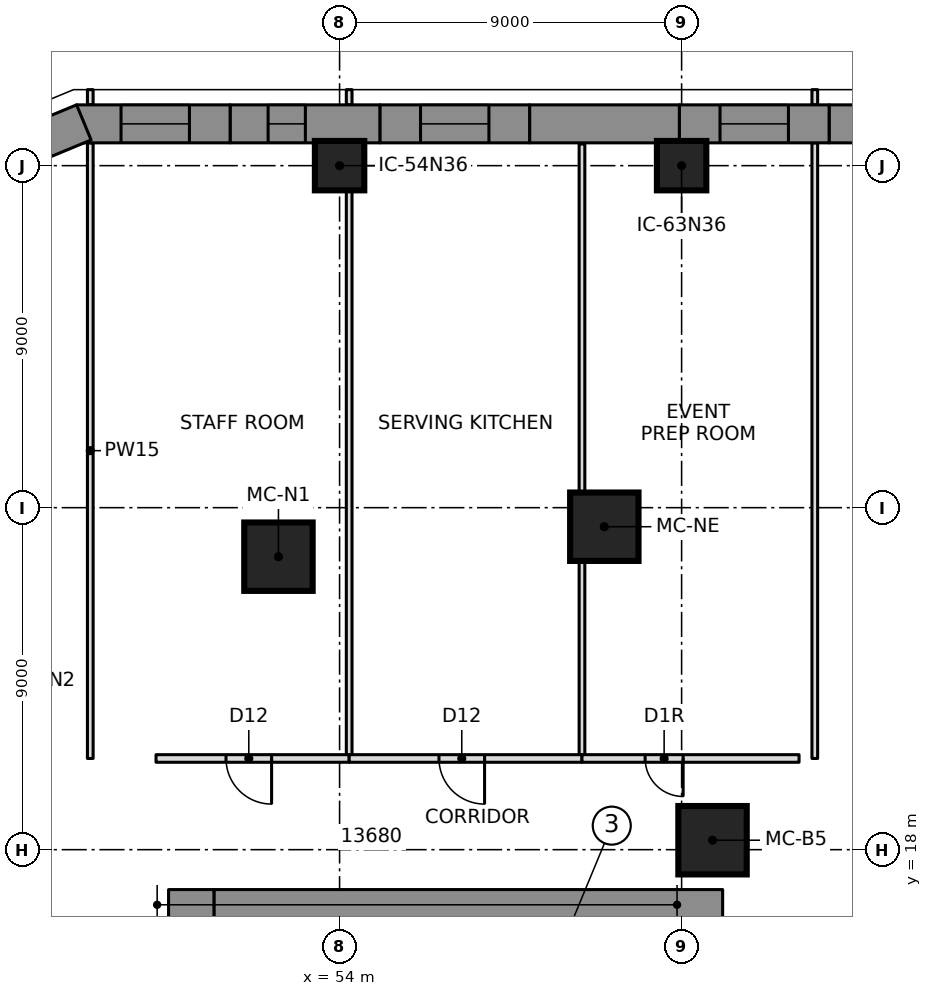
"""IFC4 building model, lengths in metres.
Left out: names, types, materials, properties, quantities, classifications, styles, units other than length and angle.
Written with IfcOpenShell. Run it as: python <this file> out.ifc"""

import sys

from ifc_helpers import new_model, si_unit, direction, frame, frame_2d, origin, origin_2d, place, context, subcontext, project, spatial, polyline, rectangle, outline, extrude, element, fill, save


model = new_model("IFC4")
c1 = context("Model", 3, precision=1e-05, world=origin(), true_north=direction((0.0, 1.0)))
c2 = subcontext(c1, "Body", "Model", "MODEL_VIEW")
j1 = project(units=[si_unit("LENGTHUNIT", "METRE"), si_unit("PLANEANGLEUNIT", "RADIAN")], contexts=[c1])
p1 = place(None, origin())
s1 = spatial("IfcSite", under=j1, at=p1, CompositionType="ELEMENT")
p2 = place(p1, origin())
s2 = spatial("IfcBuilding", under=s1, at=p2, CompositionType="ELEMENT")
p3 = place(p2, frame((0.0, 0.0, 24.0)))
s3 = spatial("IfcBuildingStorey", under=s2, at=p3, CompositionType="ELEMENT", Elevation=24.0)
p4 = place(p3, frame((50.1, 6.65, 0.0), z_axis=(0.0, 0.0, 1.0), x_axis=(0.0, 1.0, 0.0)))
e1 = element("IfcWall", 1, at=p4, inside=s3, PredefinedType="SHEAR", context=c2, shape_type="SweptSolid", body=[
    extrude(rectangle(XDim=10.3, YDim=1.2, at=frame_2d((5.15, 0.0))), origin(), (0.0, 0.0, 1.0), 5.0),
])
p5 = place(p4, frame((6.5, 0.0, 0.0)))
e2 = element("IfcOpeningElement", 2, at=p5, cuts=e1, PredefinedType="OPENING", context=c2, shape_type="SweptSolid", body=[
    extrude(rectangle(XDim=1.1, YDim=2.1, at=frame_2d((0.55, 1.05))), frame((0.0, 0.61, 0.0), z_axis=(0.0, -1.0, 0.0), x_axis=(1.0, 0.0, 0.0)), (0.0, 0.0, 1.0), 1.22),
])
p6 = place(p3, frame((50.7, 16.35, 0.0), z_axis=(0.0, 0.0, 1.0), x_axis=(1.0, 0.0, 0.0)))
e3 = element("IfcWall", 3, at=p6, inside=s3, PredefinedType="SHEAR", context=c2, shape_type="SweptSolid", body=[
    extrude(rectangle(XDim=13.38, YDim=1.2, at=frame_2d((6.69, 0.0))), origin(), (0.0, 0.0, 1.0), 5.0),
])
for number, where, z_axis, x_axis in (
    (4, (63.813, 18.249, 0.0), (0.0, 0.0, 1.0), (1.0, 0.0, 0.0)),
    (5, (60.966, 26.499, 0.0), (0.0, 0.0, 1.0), (1.0, 0.0, 0.0)),
    (6, (52.392, 25.71, 0.0), (0.0, 0.0, 1.0), (1.0, 0.0, 0.0)),
):
    element("IfcColumn", number, at=place(p3, frame(where, z_axis=z_axis, x_axis=x_axis)), inside=s3, PredefinedType="COLUMN", context=c2, shape_type="SweptSolid", body=[
        extrude(rectangle(XDim=1.8, YDim=1.8, at=origin_2d()), origin(), (0.0, 0.0, 1.0), 5.0),
    ])
for number, where, z_axis, x_axis in (
    (7, (54.0, 36.0, 0.0), (0.0, 0.0, 1.0), (1.0, 0.0, 0.0)),
    (8, (63.0, 36.0, 0.0), (0.0, 0.0, 1.0), (1.0, 0.0, 0.0)),
):
    element("IfcColumn", number, at=place(p3, frame(where, z_axis=z_axis, x_axis=x_axis)), inside=s3, PredefinedType="COLUMN", context=c2, shape_type="SweptSolid", body=[
        extrude(rectangle(XDim=1.3, YDim=1.3, at=origin_2d()), origin(), (0.0, 0.0, 1.0), 4.65),
    ])
p7 = place(p3, frame((70.821, 37.1, 0.0), z_axis=(0.0, 0.0, 1.0), x_axis=(-1.0, 0.0, 0.0)))
e9 = element("IfcWall", 9, at=p7, inside=s3, PredefinedType="NOTDEFINED", context=c2, shape_type="SweptSolid", body=[
    extrude(outline(polyline([(-0.1, -0.5), (3.94, -0.5), (3.94, 0.5), (0.1, 0.5), (-0.1, -0.5)])), origin(), (0.0, 0.0, 1.0), 4.7),
])
p8 = place(p7, frame((1.07, 0.0, 0.9)))
e10 = element("IfcOpeningElement", 10, at=p8, cuts=e9, PredefinedType="OPENING", context=c2, shape_type="SweptSolid", body=[
    extrude(rectangle(XDim=1.8, YDim=2.4, at=frame_2d((0.9, 1.2))), frame((0.0, 0.51, 0.0), z_axis=(0.0, -1.0, 0.0), x_axis=(1.0, 0.0, 0.0)), (0.0, 0.0, 1.0), 1.02),
])
p9 = place(p3, frame((66.881, 37.1, 0.0), z_axis=(0.0, 0.0, 1.0), x_axis=(-1.0, 0.0, 0.0)))
e11 = element("IfcWall", 11, at=p9, inside=s3, PredefinedType="NOTDEFINED", context=c2, shape_type="SweptSolid", body=[
    extrude(outline(polyline([(0.0, -0.5), (3.94, -0.5), (3.94, 0.5), (0.0, 0.5), (0.0, -0.5)])), origin(), (0.0, 0.0, 1.0), 4.7),
])
p10 = place(p9, frame((1.07, 0.0, 0.9)))
e12 = element("IfcOpeningElement", 12, at=p10, cuts=e11, PredefinedType="OPENING", context=c2, shape_type="SweptSolid", body=[
    extrude(rectangle(XDim=1.8, YDim=2.4, at=frame_2d((0.9, 1.2))), frame((0.0, 0.51, 0.0), z_axis=(0.0, -1.0, 0.0), x_axis=(1.0, 0.0, 0.0)), (0.0, 0.0, 1.0), 1.02),
])
p11 = place(p3, frame((62.94, 37.1, 0.0), z_axis=(0.0, 0.0, 1.0), x_axis=(-1.0, 0.0, 0.0)))
e13 = element("IfcWall", 13, at=p11, inside=s3, PredefinedType="NOTDEFINED", context=c2, shape_type="SweptSolid", body=[
    extrude(outline(polyline([(0.0, -0.5), (3.94, -0.5), (3.94, 0.5), (0.0, 0.5), (0.0, -0.5)])), origin(), (0.0, 0.0, 1.0), 4.7),
])
p12 = place(p3, frame((59.0, 37.1, 0.0), z_axis=(0.0, 0.0, 1.0), x_axis=(-1.0, 0.0, 0.0)))
e14 = element("IfcWall", 14, at=p12, inside=s3, PredefinedType="NOTDEFINED", context=c2, shape_type="SweptSolid", body=[
    extrude(outline(polyline([(0.0, -0.5), (3.94, -0.5), (3.94, 0.5), (0.0, 0.5), (0.0, -0.5)])), origin(), (0.0, 0.0, 1.0), 4.7),
])
p13 = place(p12, frame((1.07, 0.0, 0.9)))
e15 = element("IfcOpeningElement", 15, at=p13, cuts=e14, PredefinedType="OPENING", context=c2, shape_type="SweptSolid", body=[
    extrude(rectangle(XDim=1.8, YDim=2.4, at=frame_2d((0.9, 1.2))), frame((0.0, 0.51, 0.0), z_axis=(0.0, -1.0, 0.0), x_axis=(1.0, 0.0, 0.0)), (0.0, 0.0, 1.0), 1.02),
])
p14 = place(p3, frame((55.06, 37.1, 0.0), z_axis=(0.0, 0.0, 1.0), x_axis=(-1.0, 0.0, 0.0)))
e16 = element("IfcWall", 16, at=p14, inside=s3, PredefinedType="NOTDEFINED", context=c2, shape_type="SweptSolid", body=[
    extrude(outline(polyline([(0.0, -0.5), (3.94, -0.5), (3.94, 0.5), (0.0, 0.5), (0.0, -0.5)])), origin(), (0.0, 0.0, 1.0), 4.7),
])
p15 = place(p14, frame((1.96, 0.0, 0.9)))
e17 = element("IfcOpeningElement", 17, at=p15, cuts=e16, PredefinedType="OPENING", context=c2, shape_type="SweptSolid", body=[
    extrude(rectangle(XDim=0.981, YDim=2.4, at=frame_2d((0.49, 1.2))), frame((0.0, 0.51, 0.0), z_axis=(0.0, -1.0, 0.0), x_axis=(1.0, 0.0, 0.0)), (0.0, 0.0, 1.0), 1.02),
])
p16 = place(p3, frame((51.119, 37.1, 0.0), z_axis=(0.0, 0.0, 1.0), x_axis=(-1.0, 0.0, 0.0)))
e18 = element("IfcWall", 18, at=p16, inside=s3, PredefinedType="NOTDEFINED", context=c2, shape_type="SweptSolid", body=[
    extrude(outline(polyline([(0.0, -0.5), (4.04, -0.5), (3.841, 0.5), (0.0, 0.5), (0.0, -0.5)])), origin(), (0.0, 0.0, 1.0), 4.7),
])
p17 = place(p16, frame((1.07, 0.0, 0.9)))
e19 = element("IfcOpeningElement", 19, at=p17, cuts=e18, PredefinedType="OPENING", context=c2, shape_type="SweptSolid", body=[
    extrude(rectangle(XDim=1.8, YDim=2.4, at=frame_2d((0.9, 1.2))), frame((0.0, 0.51, 0.0), z_axis=(0.0, -1.0, 0.0), x_axis=(1.0, 0.0, 0.0)), (0.0, 0.0, 1.0), 1.02),
])
p18 = place(p3, frame((47.179, 37.1, 0.0), z_axis=(0.0, 0.0, 1.0), x_axis=(-0.923862365102, -0.382724875529, 0.0)))
e20 = element("IfcWall", 20, at=p18, inside=s3, PredefinedType="NOTDEFINED", context=c2, shape_type="SweptSolid", body=[
    extrude(outline(polyline([(-0.1, -0.5), (3.482, -0.5), (3.068, 0.5), (0.1, 0.5), (-0.1, -0.5)])), origin(), (0.0, 0.0, 1.0), 4.7),
])
p19 = place(p3, frame((47.44, 20.4, 0.0), z_axis=(0.0, 0.0, 1.0), x_axis=(0.0, 1.0, 0.0)))
e21 = element("IfcWall", 21, at=p19, inside=s3, PredefinedType="PARTITIONING", context=c2, shape_type="SweptSolid", body=[
    extrude(rectangle(XDim=16.2, YDim=0.15, at=frame_2d((8.1, 0.0))), origin(), (0.0, 0.0, 1.0), 4.55),
])
p20 = place(p3, frame((47.44, 37.6, 0.0), z_axis=(0.0, 0.0, 1.0), x_axis=(0.0, 1.0, 0.0)))
e22 = element("IfcWall", 22, at=p20, inside=s3, PredefinedType="PARTITIONING", context=c2, shape_type="SweptSolid", body=[
    extrude(rectangle(XDim=0.4, YDim=0.15, at=frame_2d((0.2, 0.0))), origin(), (0.0, 0.0, 1.0), 4.55),
])
p21 = place(p3, frame((54.252, 20.4, 0.0), z_axis=(0.0, 0.0, 1.0), x_axis=(0.0, 1.0, 0.0)))
e23 = element("IfcWall", 23, at=p21, inside=s3, PredefinedType="PARTITIONING", context=c2, shape_type="SweptSolid", body=[
    extrude(rectangle(XDim=16.2, YDim=0.15, at=frame_2d((8.1, 0.0))), origin(), (0.0, 0.0, 1.0), 4.55),
])
p22 = place(p3, frame((54.252, 37.6, 0.0), z_axis=(0.0, 0.0, 1.0), x_axis=(0.0, 1.0, 0.0)))
e24 = element("IfcWall", 24, at=p22, inside=s3, PredefinedType="PARTITIONING", context=c2, shape_type="SweptSolid", body=[
    extrude(rectangle(XDim=0.4, YDim=0.15, at=frame_2d((0.2, 0.0))), origin(), (0.0, 0.0, 1.0), 4.55),
])
p23 = place(p3, frame((60.378, 20.4, 0.0), z_axis=(0.0, 0.0, 1.0), x_axis=(0.0, 1.0, 0.0)))
e25 = element("IfcWall", 25, at=p23, inside=s3, PredefinedType="PARTITIONING", context=c2, shape_type="SweptSolid", body=[
    extrude(rectangle(XDim=16.17, YDim=0.15, at=frame_2d((8.085, 0.0))), origin(), (0.0, 0.0, 1.0), 4.55),
])
p24 = place(p3, frame((66.504, 20.4, 0.0), z_axis=(0.0, 0.0, 1.0), x_axis=(0.0, 1.0, 0.0)))
e26 = element("IfcWall", 26, at=p24, inside=s3, PredefinedType="PARTITIONING", context=c2, shape_type="SweptSolid", body=[
    extrude(rectangle(XDim=16.2, YDim=0.15, at=frame_2d((8.1, 0.0))), origin(), (0.0, 0.0, 1.0), 4.55),
])
p25 = place(p3, frame((66.504, 37.6, 0.0), z_axis=(0.0, 0.0, 1.0), x_axis=(0.0, 1.0, 0.0)))
e27 = element("IfcWall", 27, at=p25, inside=s3, PredefinedType="PARTITIONING", context=c2, shape_type="SweptSolid", body=[
    extrude(rectangle(XDim=0.4, YDim=0.15, at=frame_2d((0.2, 0.0))), origin(), (0.0, 0.0, 1.0), 4.55),
])
p26 = place(p3, frame((54.252, 20.4, 0.0), z_axis=(0.0, 0.0, 1.0), x_axis=(-1.0, 0.0, 0.0)))
e28 = element("IfcWall", 28, at=p26, inside=s3, PredefinedType="PARTITIONING", context=c2, shape_type="SweptSolid", body=[
    extrude(rectangle(XDim=5.082, YDim=0.2, at=frame_2d((2.541, 0.0))), origin(), (0.0, 0.0, 1.0), 4.55),
])
p27 = place(p26, frame((2.041, 0.0, 0.0)))
e29 = element("IfcOpeningElement", 29, at=p27, cuts=e28, PredefinedType="OPENING", context=c2, shape_type="SweptSolid", body=[
    extrude(rectangle(XDim=1.2, YDim=2.1, at=frame_2d((0.6, 1.05))), frame((0.0, 0.11, 0.0), z_axis=(0.0, -1.0, 0.0), x_axis=(1.0, 0.0, 0.0)), (0.0, 0.0, 1.0), 0.22),
])
p28 = place(p3, frame((60.378, 20.4, 0.0), z_axis=(0.0, 0.0, 1.0), x_axis=(-1.0, 0.0, 0.0)))
e30 = element("IfcWall", 30, at=p28, inside=s3, PredefinedType="PARTITIONING", context=c2, shape_type="SweptSolid", body=[
    extrude(rectangle(XDim=6.126, YDim=0.2, at=frame_2d((3.063, 0.0))), origin(), (0.0, 0.0, 1.0), 4.55),
])
p29 = place(p28, frame((2.563, 0.0, 0.0)))
e31 = element("IfcOpeningElement", 31, at=p29, cuts=e30, PredefinedType="OPENING", context=c2, shape_type="SweptSolid", body=[
    extrude(rectangle(XDim=1.2, YDim=2.1, at=frame_2d((0.6, 1.05))), frame((0.0, 0.11, 0.0), z_axis=(0.0, -1.0, 0.0), x_axis=(1.0, 0.0, 0.0)), (0.0, 0.0, 1.0), 0.22),
])
p30 = place(p3, frame((66.09, 20.4, 0.0), z_axis=(0.0, 0.0, 1.0), x_axis=(-1.0, 0.0, 0.0)))
e32 = element("IfcWall", 32, at=p30, inside=s3, PredefinedType="PARTITIONING", context=c2, shape_type="SweptSolid", body=[
    extrude(rectangle(XDim=5.712, YDim=0.2, at=frame_2d((2.856, 0.0))), origin(), (0.0, 0.0, 1.0), 4.55),
])
p31 = place(p30, frame((3.05, 0.0, 0.0)))
e33 = element("IfcOpeningElement", 33, at=p31, cuts=e32, PredefinedType="OPENING", context=c2, shape_type="SweptSolid", body=[
    extrude(rectangle(XDim=1.0, YDim=2.1, at=frame_2d((0.5, 1.05))), frame((0.0, 0.11, 0.0), z_axis=(0.0, -1.0, 0.0), x_axis=(1.0, 0.0, 0.0)), (0.0, 0.0, 1.0), 0.22),
])
p32 = place(p10, origin())
e34 = element("IfcWindow", 34, at=p32, inside=s3, PartitioningType="SINGLE_PANEL", PredefinedType="WINDOW", context=c2, shape_type="SweptSolid", body=[
    extrude(rectangle(XDim=1.8, YDim=2.4, at=frame_2d((0.9, 1.2))), frame((0.0, 0.5, 0.0), z_axis=(0.0, -1.0, 0.0), x_axis=(1.0, 0.0, 0.0)), (0.0, 0.0, 1.0), 0.06),
])
fill(e12, e34)
p33 = place(p13, origin())
e35 = element("IfcWindow", 35, at=p33, inside=s3, PartitioningType="SINGLE_PANEL", PredefinedType="WINDOW", context=c2, shape_type="SweptSolid", body=[
    extrude(rectangle(XDim=1.8, YDim=2.4, at=frame_2d((0.9, 1.2))), frame((0.0, 0.5, 0.0), z_axis=(0.0, -1.0, 0.0), x_axis=(1.0, 0.0, 0.0)), (0.0, 0.0, 1.0), 0.06),
])
fill(e15, e35)
p34 = place(p15, origin())
e36 = element("IfcWindow", 36, at=p34, inside=s3, PartitioningType="SINGLE_PANEL", PredefinedType="WINDOW", context=c2, shape_type="SweptSolid", body=[
    extrude(rectangle(XDim=0.981, YDim=2.4, at=frame_2d((0.49, 1.2))), frame((0.0, 0.5, 0.0), z_axis=(0.0, -1.0, 0.0), x_axis=(1.0, 0.0, 0.0)), (0.0, 0.0, 1.0), 0.06),
])
fill(e17, e36)
p35 = place(p17, origin())
e37 = element("IfcWindow", 37, at=p35, inside=s3, PartitioningType="SINGLE_PANEL", PredefinedType="WINDOW", context=c2, shape_type="SweptSolid", body=[
    extrude(rectangle(XDim=1.8, YDim=2.4, at=frame_2d((0.9, 1.2))), frame((0.0, 0.5, 0.0), z_axis=(0.0, -1.0, 0.0), x_axis=(1.0, 0.0, 0.0)), (0.0, 0.0, 1.0), 0.06),
])
fill(e19, e37)
p36 = place(p27, origin())
e38 = element("IfcDoor", 38, at=p36, inside=s3, OperationType="SINGLE_SWING_RIGHT", PredefinedType="DOOR", context=c2, shape_type="SweptSolid", body=[
    extrude(rectangle(XDim=1.2, YDim=2.1, at=frame_2d((0.6, 1.05))), frame((0.0, 0.025, 0.0), z_axis=(0.0, -1.0, 0.0), x_axis=(1.0, 0.0, 0.0)), (0.0, 0.0, 1.0), 0.05),
])
fill(e29, e38)
p37 = place(p29, origin())
e39 = element("IfcDoor", 39, at=p37, inside=s3, OperationType="SINGLE_SWING_RIGHT", PredefinedType="DOOR", context=c2, shape_type="SweptSolid", body=[
    extrude(rectangle(XDim=1.2, YDim=2.1, at=frame_2d((0.6, 1.05))), frame((0.0, 0.025, 0.0), z_axis=(0.0, -1.0, 0.0), x_axis=(1.0, 0.0, 0.0)), (0.0, 0.0, 1.0), 0.05),
])
fill(e31, e39)
p38 = place(p31, origin())
e40 = element("IfcDoor", 40, at=p38, inside=s3, OperationType="SINGLE_SWING_RIGHT", PredefinedType="DOOR", context=c2, shape_type="SweptSolid", body=[
    extrude(rectangle(XDim=1.0, YDim=2.1, at=frame_2d((0.5, 1.05))), frame((0.0, 0.025, 0.0), z_axis=(0.0, -1.0, 0.0), x_axis=(1.0, 0.0, 0.0)), (0.0, 0.0, 1.0), 0.05),
])
fill(e33, e40)
save(model, sys.argv[1])
